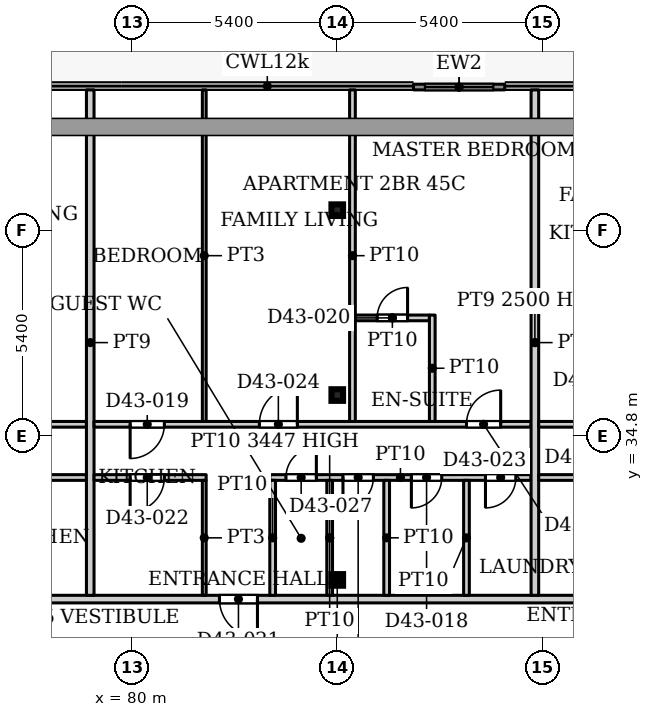
"""IFC4 building model, lengths in metres.
Left out: names, types, materials, properties, quantities, classifications, styles, units other than length and angle.
Written with IfcOpenShell. Run it as: python <this file> out.ifc"""

import sys

from ifc_helpers import new_model, si_unit, direction, frame, frame_2d, origin, origin_2d, place, context, subcontext, project, spatial, rectangle, hollow_rectangle, extrude, source, transform, mapped, element, fill, save


model = new_model("IFC4")
c1 = context("Model", 3, precision=1e-05, world=origin(), true_north=direction((0.0, 1.0)))
c2 = subcontext(c1, "Body", "Model", "MODEL_VIEW")
j1 = project(units=[si_unit("LENGTHUNIT", "METRE"), si_unit("PLANEANGLEUNIT", "RADIAN")], contexts=[c1])
p1 = place(None, origin())
s1 = spatial("IfcSite", under=j1, at=p1, CompositionType="ELEMENT")
p2 = place(p1, origin())
s2 = spatial("IfcBuilding", under=s1, at=p2, CompositionType="ELEMENT")
p3 = place(p2, frame((0.0, 0.0, 191.6)))
s3 = spatial("IfcBuildingStorey", under=s2, at=p3, CompositionType="ELEMENT", Elevation=191.6)
for number, where, z_axis, x_axis in (
    (1, (85.4, 31.005, 0.0), (0.0, 0.0, 1.0), (1.0, 0.0, 0.0)),
    (2, (85.4, 35.87, 0.0), (0.0, 0.0, 1.0), (1.0, 0.0, 0.0)),
    (3, (85.4, 40.735, 0.0), (0.0, 0.0, 1.0), (1.0, 0.0, 0.0)),
):
    element("IfcColumn", number, at=place(p3, frame(where, z_axis=z_axis, x_axis=x_axis)), inside=s3, PredefinedType="COLUMN", context=c2, shape_type="SweptSolid", body=[
        extrude(hollow_rectangle(XDim=0.305, YDim=0.305, WallThickness=0.016, InnerFilletRadius=0.016, OuterFilletRadius=0.032, at=origin_2d()), origin(), (0.0, 0.0, 1.0), 3.9),
    ])
p4 = place(p3, frame((87.406, 43.975, 0.0), z_axis=(0.0, 0.0, 1.0), x_axis=(1.0, 0.0, 0.0)))
e4 = element("IfcWall", 4, at=p4, inside=s3, PredefinedType="SOLIDWALL", context=c2, shape_type="SweptSolid", body=[
    extrude(rectangle(XDim=2.4, YDim=0.15, at=frame_2d((1.2, 0.0))), origin(), (0.0, 0.0, 1.0), 3.75),
])
p5 = place(p4, frame((0.3, 0.0, 0.0)))
e5 = element("IfcOpeningElement", 5, at=p5, cuts=e4, PredefinedType="OPENING", context=c2, shape_type="SweptSolid", body=[
    extrude(rectangle(XDim=1.8, YDim=2.4, at=frame_2d((0.9, 1.2))), frame((0.0, 0.085, 0.0), z_axis=(0.0, -1.0, 0.0), x_axis=(1.0, 0.0, 0.0)), (0.0, 0.0, 1.0), 0.17),
])
p6 = place(p3, frame((53.549, 30.5, 0.0), z_axis=(0.0, 0.0, 1.0), x_axis=(1.0, 0.0, 0.0)))
e6 = element("IfcWall", 6, at=p6, inside=s3, PredefinedType="PARTITIONING", context=c2, shape_type="SweptSolid", body=[
    extrude(rectangle(XDim=44.551, YDim=0.2, at=frame_2d((22.275, 0.0))), origin(), (0.0, 0.0, 1.0), 3.6),
])
p7 = place(p6, frame((8.351, 0.0, 0.0)))
e7 = element("IfcOpeningElement", 7, at=p7, cuts=e6, PredefinedType="OPENING", context=c2, shape_type="SweptSolid", body=[
    extrude(rectangle(XDim=1.0, YDim=2.1, at=frame_2d((0.5, 1.05))), frame((0.0, 0.11, 0.0), z_axis=(0.0, -1.0, 0.0), x_axis=(1.0, 0.0, 0.0)), (0.0, 0.0, 1.0), 0.22),
])
p8 = place(p6, frame((12.551, 0.0, 0.0)))
e8 = element("IfcOpeningElement", 8, at=p8, cuts=e6, PredefinedType="OPENING", context=c2, shape_type="SweptSolid", body=[
    extrude(rectangle(XDim=1.0, YDim=2.1, at=frame_2d((0.5, 1.05))), frame((0.0, 0.11, 0.0), z_axis=(0.0, -1.0, 0.0), x_axis=(1.0, 0.0, 0.0)), (0.0, 0.0, 1.0), 0.22),
])
p9 = place(p6, frame((28.751, 0.0, 0.0)))
e9 = element("IfcOpeningElement", 9, at=p9, cuts=e6, PredefinedType="OPENING", context=c2, shape_type="SweptSolid", body=[
    extrude(rectangle(XDim=1.0, YDim=2.1, at=frame_2d((0.5, 1.05))), frame((0.0, 0.11, 0.0), z_axis=(0.0, -1.0, 0.0), x_axis=(1.0, 0.0, 0.0)), (0.0, 0.0, 1.0), 0.22),
])
p10 = place(p6, frame((40.751, 0.0, 0.0)))
e10 = element("IfcOpeningElement", 10, at=p10, cuts=e6, PredefinedType="OPENING", context=c2, shape_type="SweptSolid", body=[
    extrude(rectangle(XDim=1.0, YDim=2.1, at=frame_2d((0.5, 1.05))), frame((0.0, 0.11, 0.0), z_axis=(0.0, -1.0, 0.0), x_axis=(1.0, 0.0, 0.0)), (0.0, 0.0, 1.0), 0.22),
])
p11 = place(p3, frame((65.5, 35.1, 0.0), z_axis=(0.0, 0.0, 1.0), x_axis=(1.0, 0.0, 0.0)))
e11 = element("IfcWall", 11, at=p11, inside=s3, PredefinedType="PARTITIONING", context=c2, shape_type="SweptSolid", body=[
    extrude(rectangle(XDim=13.3, YDim=0.15, at=frame_2d((6.65, 0.0))), origin(), (0.0, 0.0, 1.0), 3.6),
])
p12 = place(p11, frame((1.4, 0.0, 0.0)))
e12 = element("IfcOpeningElement", 12, at=p12, cuts=e11, PredefinedType="OPENING", context=c2, shape_type="SweptSolid", body=[
    extrude(rectangle(XDim=0.9, YDim=2.1, at=frame_2d((0.45, 1.05))), frame((0.0, 0.085, 0.0), z_axis=(0.0, -1.0, 0.0), x_axis=(1.0, 0.0, 0.0)), (0.0, 0.0, 1.0), 0.17),
])
p13 = place(p11, frame((10.5, 0.0, 0.0)))
e13 = element("IfcOpeningElement", 13, at=p13, cuts=e11, PredefinedType="OPENING", context=c2, shape_type="SweptSolid", body=[
    extrude(rectangle(XDim=1.0, YDim=2.1, at=frame_2d((0.5, 1.05))), frame((0.0, 0.085, 0.0), z_axis=(0.0, -1.0, 0.0), x_axis=(1.0, 0.0, 0.0)), (0.0, 0.0, 1.0), 0.17),
])
p14 = place(p11, frame((6.8, 0.0, 0.0)))
e14 = element("IfcOpeningElement", 14, at=p14, cuts=e11, PredefinedType="OPENING", context=c2, shape_type="SweptSolid", body=[
    extrude(rectangle(XDim=0.9, YDim=2.1, at=frame_2d((0.45, 1.05))), frame((0.0, 0.085, 0.0), z_axis=(0.0, -1.0, 0.0), x_axis=(1.0, 0.0, 0.0)), (0.0, 0.0, 1.0), 0.17),
])
p15 = place(p3, frame((68.625, 33.7, 0.0), z_axis=(0.0, 0.0, 1.0), x_axis=(1.0, 0.0, 0.0)))
e15 = element("IfcWall", 15, at=p15, inside=s3, PredefinedType="PARTITIONING", context=c2, shape_type="SweptSolid", body=[
    extrude(rectangle(XDim=10.175, YDim=0.15, at=frame_2d((5.087, 0.0))), origin(), (0.0, 0.0, 1.0), 3.6),
])
p16 = place(p15, frame((1.175, 0.0, 0.0)))
e16 = element("IfcOpeningElement", 16, at=p16, cuts=e15, PredefinedType="OPENING", context=c2, shape_type="SweptSolid", body=[
    extrude(rectangle(XDim=0.8, YDim=2.1, at=frame_2d((0.4, 1.05))), frame((0.0, 0.085, 0.0), z_axis=(0.0, -1.0, 0.0), x_axis=(1.0, 0.0, 0.0)), (0.0, 0.0, 1.0), 0.17),
])
p17 = place(p15, frame((7.025, 0.0, 0.0)))
e17 = element("IfcOpeningElement", 17, at=p17, cuts=e15, PredefinedType="OPENING", context=c2, shape_type="SweptSolid", body=[
    extrude(rectangle(XDim=0.9, YDim=2.1, at=frame_2d((0.45, 1.05))), frame((0.0, 0.085, 0.0), z_axis=(0.0, -1.0, 0.0), x_axis=(1.0, 0.0, 0.0)), (0.0, 0.0, 1.0), 0.17),
])
p18 = place(p15, frame((3.875, 0.0, 0.0)))
e18 = element("IfcOpeningElement", 18, at=p18, cuts=e15, PredefinedType="OPENING", context=c2, shape_type="SweptSolid", body=[
    extrude(rectangle(XDim=0.8, YDim=2.1, at=frame_2d((0.4, 1.05))), frame((0.0, 0.085, 0.0), z_axis=(0.0, -1.0, 0.0), x_axis=(1.0, 0.0, 0.0)), (0.0, 0.0, 1.0), 0.17),
])
p19 = place(p3, frame((78.9, 30.6, 0.0), z_axis=(0.0, 0.0, 1.0), x_axis=(0.0, 1.0, 0.0)))
e19 = element("IfcWall", 19, at=p19, inside=s3, PredefinedType="PARTITIONING", context=c2, shape_type="SweptSolid", body=[
    extrude(rectangle(XDim=13.3, YDim=0.2, at=frame_2d((6.65, 0.0))), origin(), (0.0, 0.0, 1.0), 3.6),
])
p20 = place(p3, frame((79.0, 33.7, 0.0), z_axis=(0.0, 0.0, 1.0), x_axis=(1.0, 0.0, 0.0)))
e20 = element("IfcWall", 20, at=p20, inside=s3, PredefinedType="PARTITIONING", context=c2, shape_type="SweptSolid", body=[
    extrude(rectangle(XDim=2.95, YDim=0.15, at=frame_2d((1.475, 0.0))), origin(), (0.0, 0.0, 1.0), 3.6),
])
p21 = place(p20, frame((0.95, 0.0, 0.0)))
e21 = element("IfcOpeningElement", 21, at=p21, cuts=e20, PredefinedType="OPENING", context=c2, shape_type="SweptSolid", body=[
    extrude(rectangle(XDim=0.9, YDim=2.1, at=frame_2d((0.45, 1.05))), frame((0.0, 0.085, 0.0), z_axis=(0.0, -1.0, 0.0), x_axis=(1.0, 0.0, 0.0)), (0.0, 0.0, 1.0), 0.17),
])
p22 = place(p3, frame((79.0, 35.1, 0.0), z_axis=(0.0, 0.0, 1.0), x_axis=(1.0, 0.0, 0.0)))
e22 = element("IfcWall", 22, at=p22, inside=s3, PredefinedType="PARTITIONING", context=c2, shape_type="SweptSolid", body=[
    extrude(rectangle(XDim=11.5, YDim=0.15, at=frame_2d((5.75, 0.0))), origin(), (0.0, 0.0, 1.0), 3.6),
])
p23 = place(p22, frame((0.95, 0.0, 0.0)))
e23 = element("IfcOpeningElement", 23, at=p23, cuts=e22, PredefinedType="OPENING", context=c2, shape_type="SweptSolid", body=[
    extrude(rectangle(XDim=0.9, YDim=2.1, at=frame_2d((0.45, 1.05))), frame((0.0, 0.085, 0.0), z_axis=(0.0, -1.0, 0.0), x_axis=(1.0, 0.0, 0.0)), (0.0, 0.0, 1.0), 0.17),
])
p24 = place(p22, frame((4.35, 0.0, 0.0)))
e24 = element("IfcOpeningElement", 24, at=p24, cuts=e22, PredefinedType="OPENING", context=c2, shape_type="SweptSolid", body=[
    extrude(rectangle(XDim=1.0, YDim=2.1, at=frame_2d((0.5, 1.05))), frame((0.0, 0.085, 0.0), z_axis=(0.0, -1.0, 0.0), x_axis=(1.0, 0.0, 0.0)), (0.0, 0.0, 1.0), 0.17),
])
p25 = place(p22, frame((9.8, 0.0, 0.0)))
e25 = element("IfcOpeningElement", 25, at=p25, cuts=e22, PredefinedType="OPENING", context=c2, shape_type="SweptSolid", body=[
    extrude(rectangle(XDim=0.9, YDim=2.1, at=frame_2d((0.45, 1.05))), frame((0.0, 0.085, 0.0), z_axis=(0.0, -1.0, 0.0), x_axis=(1.0, 0.0, 0.0)), (0.0, 0.0, 1.0), 0.17),
])
p26 = place(p3, frame((81.9, 30.6, 0.0), z_axis=(0.0, 0.0, 1.0), x_axis=(0.0, 1.0, 0.0)))
e26 = element("IfcWall", 26, at=p26, inside=s3, PredefinedType="PARTITIONING", context=c2, shape_type="SweptSolid", body=[
    extrude(rectangle(XDim=3.025, YDim=0.1, at=frame_2d((1.512, 0.0))), origin(), (0.0, 0.0, 1.0), 3.6),
])
p27 = place(p3, frame((81.9, 35.175, 0.0), z_axis=(0.0, 0.0, 1.0), x_axis=(0.0, 1.0, 0.0)))
e27 = element("IfcWall", 27, at=p27, inside=s3, PredefinedType="PARTITIONING", context=c2, shape_type="SweptSolid", body=[
    extrude(rectangle(XDim=8.725, YDim=0.1, at=frame_2d((4.362, 0.0))), origin(), (0.0, 0.0, 1.0), 3.6),
])
p28 = place(p3, frame((83.625, 33.7, 0.0), z_axis=(0.0, 0.0, 1.0), x_axis=(1.0, 0.0, 0.0)))
e28 = element("IfcWall", 28, at=p28, inside=s3, PredefinedType="PARTITIONING", context=c2, shape_type="SweptSolid", body=[
    extrude(rectangle(XDim=6.875, YDim=0.15, at=frame_2d((3.438, 0.0))), origin(), (0.0, 0.0, 1.0), 3.6),
])
p29 = place(p28, frame((3.725, 0.0, 0.0)))
e29 = element("IfcOpeningElement", 29, at=p29, cuts=e28, PredefinedType="OPENING", context=c2, shape_type="SweptSolid", body=[
    extrude(rectangle(XDim=0.8, YDim=2.1, at=frame_2d((0.4, 1.05))), frame((0.0, 0.085, 0.0), z_axis=(0.0, -1.0, 0.0), x_axis=(1.0, 0.0, 0.0)), (0.0, 0.0, 1.0), 0.17),
])
p30 = place(p28, frame((5.675, 0.0, 0.0)))
e30 = element("IfcOpeningElement", 30, at=p30, cuts=e28, PredefinedType="OPENING", context=c2, shape_type="SweptSolid", body=[
    extrude(rectangle(XDim=0.8, YDim=2.1, at=frame_2d((0.4, 1.05))), frame((0.0, 0.085, 0.0), z_axis=(0.0, -1.0, 0.0), x_axis=(1.0, 0.0, 0.0)), (0.0, 0.0, 1.0), 0.17),
])
p31 = place(p28, frame((1.925, 0.0, 0.0)))
e31 = element("IfcOpeningElement", 31, at=p31, cuts=e28, PredefinedType="OPENING", context=c2, shape_type="SweptSolid", body=[
    extrude(rectangle(XDim=0.8, YDim=2.1, at=frame_2d((0.4, 1.05))), frame((0.0, 0.085, 0.0), z_axis=(0.0, -1.0, 0.0), x_axis=(1.0, 0.0, 0.0)), (0.0, 0.0, 1.0), 0.17),
])
p32 = place(p28, frame((0.425, 0.0, 0.0)))
e32 = element("IfcOpeningElement", 32, at=p32, cuts=e28, PredefinedType="OPENING", context=c2, shape_type="SweptSolid", body=[
    extrude(rectangle(XDim=0.8, YDim=2.1, at=frame_2d((0.4, 1.05))), frame((0.0, 0.085, 0.0), z_axis=(0.0, -1.0, 0.0), x_axis=(1.0, 0.0, 0.0)), (0.0, 0.0, 1.0), 0.17),
])
p33 = place(p3, frame((83.7, 30.6, 0.0), z_axis=(0.0, 0.0, 1.0), x_axis=(0.0, 1.0, 0.0)))
e33 = element("IfcWall", 33, at=p33, inside=s3, PredefinedType="PARTITIONING", context=c2, shape_type="SweptSolid", body=[
    extrude(rectangle(XDim=3.025, YDim=0.15, at=frame_2d((1.512, 0.0))), origin(), (0.0, 0.0, 1.0), 3.6),
])
p34 = place(p3, frame((85.2, 30.6, 0.0), z_axis=(0.0, 0.0, 1.0), x_axis=(0.0, 1.0, 0.0)))
e34 = element("IfcWall", 34, at=p34, inside=s3, PredefinedType="PARTITIONING", context=c2, shape_type="SweptSolid", body=[
    extrude(rectangle(XDim=3.025, YDim=0.15, at=frame_2d((1.512, 0.0))), origin(), (0.0, 0.0, 1.0), 3.447),
])
p35 = place(p3, frame((85.8, 35.175, 0.0), z_axis=(0.0, 0.0, 1.0), x_axis=(0.0, 1.0, 0.0)))
e35 = element("IfcWall", 35, at=p35, inside=s3, PredefinedType="PARTITIONING", context=c2, shape_type="SweptSolid", body=[
    extrude(rectangle(XDim=8.725, YDim=0.15, at=frame_2d((4.362, 0.0))), origin(), (0.0, 0.0, 1.0), 3.6),
])
p36 = place(p3, frame((85.875, 37.9, 0.0), z_axis=(0.0, 0.0, 1.0), x_axis=(1.0, 0.0, 0.0)))
e36 = element("IfcWall", 36, at=p36, inside=s3, PredefinedType="PARTITIONING", context=c2, shape_type="SweptSolid", body=[
    extrude(rectangle(XDim=1.95, YDim=0.15, at=frame_2d((0.975, 0.0))), origin(), (0.0, 0.0, 1.0), 3.6),
])
p37 = place(p36, frame((0.575, 0.0, 0.0)))
e37 = element("IfcOpeningElement", 37, at=p37, cuts=e36, PredefinedType="OPENING", context=c2, shape_type="SweptSolid", body=[
    extrude(rectangle(XDim=0.8, YDim=2.1, at=frame_2d((0.4, 1.05))), frame((0.0, 0.085, 0.0), z_axis=(0.0, -1.0, 0.0), x_axis=(1.0, 0.0, 0.0)), (0.0, 0.0, 1.0), 0.17),
])
p38 = place(p3, frame((86.7, 30.6, 0.0), z_axis=(0.0, 0.0, 1.0), x_axis=(0.0, 1.0, 0.0)))
e38 = element("IfcWall", 38, at=p38, inside=s3, PredefinedType="PARTITIONING", context=c2, shape_type="SweptSolid", body=[
    extrude(rectangle(XDim=3.025, YDim=0.15, at=frame_2d((1.512, 0.0))), origin(), (0.0, 0.0, 1.0), 3.6),
])
p39 = place(p3, frame((87.9, 35.175, 0.0), z_axis=(0.0, 0.0, 1.0), x_axis=(0.0, 1.0, 0.0)))
e39 = element("IfcWall", 39, at=p39, inside=s3, PredefinedType="PARTITIONING", context=c2, shape_type="SweptSolid", body=[
    extrude(rectangle(XDim=2.8, YDim=0.15, at=frame_2d((1.4, 0.0))), origin(), (0.0, 0.0, 1.0), 3.6),
])
p40 = place(p3, frame((88.8, 30.6, 0.0), z_axis=(0.0, 0.0, 1.0), x_axis=(0.0, 1.0, 0.0)))
e40 = element("IfcWall", 40, at=p40, inside=s3, PredefinedType="PARTITIONING", context=c2, shape_type="SweptSolid", body=[
    extrude(rectangle(XDim=3.025, YDim=0.15, at=frame_2d((1.512, 0.0))), origin(), (0.0, 0.0, 1.0), 3.6),
])
p41 = place(p3, frame((90.6, 30.6, 0.0), z_axis=(0.0, 0.0, 1.0), x_axis=(0.0, 1.0, 0.0)))
e41 = element("IfcWall", 41, at=p41, inside=s3, PredefinedType="PARTITIONING", context=c2, shape_type="SweptSolid", body=[
    extrude(rectangle(XDim=13.3, YDim=0.2, at=frame_2d((6.65, 0.0))), origin(), (0.0, 0.0, 1.0), 2.5),
])
p42 = place(p3, frame((90.7, 33.7, 0.0), z_axis=(0.0, 0.0, 1.0), x_axis=(1.0, 0.0, 0.0)))
e42 = element("IfcWall", 42, at=p42, inside=s3, PredefinedType="PARTITIONING", context=c2, shape_type="SweptSolid", body=[
    extrude(rectangle(XDim=3.25, YDim=0.15, at=frame_2d((1.625, 0.0))), origin(), (0.0, 0.0, 1.0), 3.6),
])
p43 = place(p42, frame((1.1, 0.0, 0.0)))
e43 = element("IfcOpeningElement", 43, at=p43, cuts=e42, PredefinedType="OPENING", context=c2, shape_type="SweptSolid", body=[
    extrude(rectangle(XDim=0.9, YDim=2.1, at=frame_2d((0.45, 1.05))), frame((0.0, 0.085, 0.0), z_axis=(0.0, -1.0, 0.0), x_axis=(1.0, 0.0, 0.0)), (0.0, 0.0, 1.0), 0.17),
])
p44 = place(p3, frame((90.7, 35.1, 0.0), z_axis=(0.0, 0.0, 1.0), x_axis=(1.0, 0.0, 0.0)))
e44 = element("IfcWall", 44, at=p44, inside=s3, PredefinedType="PARTITIONING", context=c2, shape_type="SweptSolid", body=[
    extrude(rectangle(XDim=9.2, YDim=0.15, at=frame_2d((4.6, 0.0))), origin(), (0.0, 0.0, 1.0), 3.6),
])
p45 = place(p44, frame((6.8, 0.0, 0.0)))
e45 = element("IfcOpeningElement", 45, at=p45, cuts=e44, PredefinedType="OPENING", context=c2, shape_type="SweptSolid", body=[
    extrude(rectangle(XDim=0.9, YDim=2.1, at=frame_2d((0.45, 1.05))), frame((0.0, 0.085, 0.0), z_axis=(0.0, -1.0, 0.0), x_axis=(1.0, 0.0, 0.0)), (0.0, 0.0, 1.0), 0.17),
])
p46 = place(p44, frame((2.1, 0.0, 0.0)))
e46 = element("IfcOpeningElement", 46, at=p46, cuts=e44, PredefinedType="OPENING", context=c2, shape_type="SweptSolid", body=[
    extrude(rectangle(XDim=1.0, YDim=2.1, at=frame_2d((0.5, 1.05))), frame((0.0, 0.085, 0.0), z_axis=(0.0, -1.0, 0.0), x_axis=(1.0, 0.0, 0.0)), (0.0, 0.0, 1.0), 0.17),
])
m1 = source(origin(), c2, "Body", "SweptSolid", [
    extrude(rectangle(XDim=1.8, YDim=2.4, at=frame_2d((0.9, 1.2))), frame((0.0, 0.025, 0.0), z_axis=(0.0, -1.0, 0.0), x_axis=(1.0, 0.0, 0.0)), (0.0, 0.0, 1.0), 0.05),
])
p47 = place(p5, origin())
e47 = element("IfcDoor", 47, at=p47, inside=s3, OperationType="SLIDING_TO_LEFT", PredefinedType="DOOR", context=c2, shape_type="MappedRepresentation", body=[
    mapped(m1, transform((0.0, 0.0, 0.0), x_axis=(1.0, 0.0, 0.0), y_axis=(0.0, 1.0, 0.0), z_axis=(0.0, 0.0, 1.0), scale=1.0)),
])
fill(e5, e47)
m2 = source(origin(), c2, "Body", "SweptSolid", [
    extrude(rectangle(XDim=0.8, YDim=2.1, at=frame_2d((0.4, 1.05))), frame((0.0, 0.025, 0.0), z_axis=(0.0, -1.0, 0.0), x_axis=(1.0, 0.0, 0.0)), (0.0, 0.0, 1.0), 0.05),
])
p48 = place(p29, origin())
e48 = element("IfcDoor", 48, at=p48, inside=s3, OperationType="SINGLE_SWING_RIGHT", PredefinedType="DOOR", context=c2, shape_type="MappedRepresentation", body=[
    mapped(m2, transform((0.0, 0.0, 0.0), x_axis=(1.0, 0.0, 0.0), y_axis=(0.0, 1.0, 0.0), z_axis=(0.0, 0.0, 1.0), scale=1.0)),
])
fill(e29, e48)
m3 = source(origin(), c2, "Body", "SweptSolid", [
    extrude(rectangle(XDim=0.9, YDim=2.1, at=frame_2d((0.45, 1.05))), frame((0.0, 0.025, 0.0), z_axis=(0.0, -1.0, 0.0), x_axis=(1.0, 0.0, 0.0)), (0.0, 0.0, 1.0), 0.05),
])
p49 = place(p23, origin())
e49 = element("IfcDoor", 49, at=p49, inside=s3, OperationType="SINGLE_SWING_RIGHT", PredefinedType="DOOR", context=c2, shape_type="MappedRepresentation", body=[
    mapped(m3, transform((0.0, 0.0, 0.0), x_axis=(1.0, 0.0, 0.0), y_axis=(0.0, 1.0, 0.0), z_axis=(0.0, 0.0, 1.0), scale=1.0)),
])
fill(e23, e49)
p50 = place(p37, origin())
e50 = element("IfcDoor", 50, at=p50, inside=s3, OperationType="SINGLE_SWING_LEFT", PredefinedType="DOOR", context=c2, shape_type="MappedRepresentation", body=[
    mapped(m2, transform((0.0, 0.0, 0.0), x_axis=(1.0, 0.0, 0.0), y_axis=(0.0, 1.0, 0.0), z_axis=(0.0, 0.0, 1.0), scale=1.0)),
])
fill(e37, e50)
m4 = source(origin(), c2, "Body", "SweptSolid", [
    extrude(rectangle(XDim=1.0, YDim=2.1, at=frame_2d((0.5, 1.05))), frame((0.0, 0.025, 0.0), z_axis=(0.0, -1.0, 0.0), x_axis=(1.0, 0.0, 0.0)), (0.0, 0.0, 1.0), 0.05),
])
p51 = place(p9, origin())
e51 = element("IfcDoor", 51, at=p51, inside=s3, OperationType="SINGLE_SWING_RIGHT", PredefinedType="DOOR", context=c2, shape_type="MappedRepresentation", body=[
    mapped(m4, transform((0.0, 0.0, 0.0), x_axis=(1.0, 0.0, 0.0), y_axis=(0.0, 1.0, 0.0), z_axis=(0.0, 0.0, 1.0), scale=1.0)),
])
fill(e9, e51)
p52 = place(p21, origin())
e52 = element("IfcDoor", 52, at=p52, inside=s3, OperationType="SINGLE_SWING_RIGHT", PredefinedType="DOOR", context=c2, shape_type="MappedRepresentation", body=[
    mapped(m3, transform((0.0, 0.0, 0.0), x_axis=(1.0, 0.0, 0.0), y_axis=(0.0, 1.0, 0.0), z_axis=(0.0, 0.0, 1.0), scale=1.0)),
])
fill(e21, e52)
p53 = place(p30, origin())
e53 = element("IfcDoor", 53, at=p53, inside=s3, OperationType="SINGLE_SWING_RIGHT", PredefinedType="DOOR", context=c2, shape_type="MappedRepresentation", body=[
    mapped(m2, transform((0.0, 0.0, 0.0), x_axis=(1.0, 0.0, 0.0), y_axis=(0.0, 1.0, 0.0), z_axis=(0.0, 0.0, 1.0), scale=1.0)),
])
fill(e30, e53)
m5 = source(origin(), c2, "Body", "SweptSolid", [
    extrude(rectangle(XDim=1.0, YDim=2.1, at=frame_2d((0.5, 1.05))), frame((0.0, 0.025, 0.0), z_axis=(0.0, -1.0, 0.0), x_axis=(1.0, 0.0, 0.0)), (0.0, 0.0, 1.0), 0.05),
])
p54 = place(p24, origin())
e54 = element("IfcDoor", 54, at=p54, inside=s3, OperationType="SINGLE_SWING_LEFT", PredefinedType="DOOR", context=c2, shape_type="MappedRepresentation", body=[
    mapped(m5, transform((0.0, 0.0, 0.0), x_axis=(1.0, 0.0, 0.0), y_axis=(0.0, 1.0, 0.0), z_axis=(0.0, 0.0, 1.0), scale=1.0)),
])
fill(e24, e54)
p55 = place(p25, origin())
e55 = element("IfcDoor", 55, at=p55, inside=s3, OperationType="SINGLE_SWING_LEFT", PredefinedType="DOOR", context=c2, shape_type="MappedRepresentation", body=[
    mapped(m3, transform((0.0, 0.0, 0.0), x_axis=(1.0, 0.0, 0.0), y_axis=(0.0, 1.0, 0.0), z_axis=(0.0, 0.0, 1.0), scale=1.0)),
])
fill(e25, e55)
p56 = place(p31, origin())
e56 = element("IfcDoor", 56, at=p56, inside=s3, OperationType="SINGLE_SWING_RIGHT", PredefinedType="DOOR", context=c2, shape_type="MappedRepresentation", body=[
    mapped(m2, transform((0.0, 0.0, 0.0), x_axis=(1.0, 0.0, 0.0), y_axis=(0.0, 1.0, 0.0), z_axis=(0.0, 0.0, 1.0), scale=1.0)),
])
fill(e31, e56)
p57 = place(p32, origin())
e57 = element("IfcDoor", 57, at=p57, inside=s3, OperationType="SINGLE_SWING_LEFT", PredefinedType="DOOR", context=c2, shape_type="MappedRepresentation", body=[
    mapped(m2, transform((0.0, 0.0, 0.0), x_axis=(1.0, 0.0, 0.0), y_axis=(0.0, 1.0, 0.0), z_axis=(0.0, 0.0, 1.0), scale=1.0)),
])
fill(e32, e57)
save(model, sys.argv[1])
